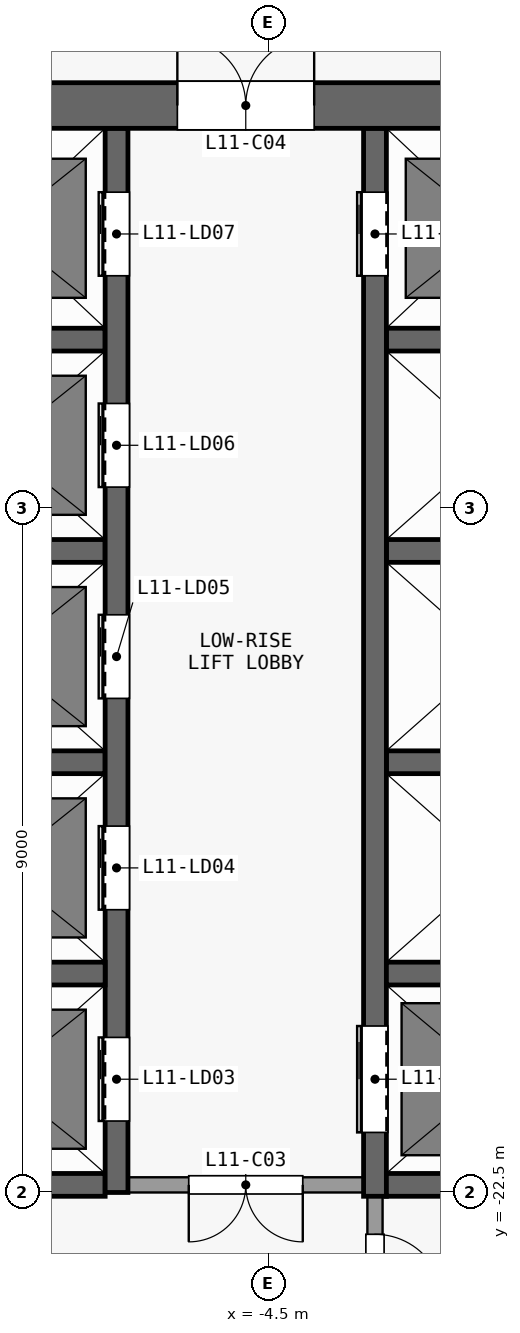
"""IFC4 building model, lengths in metres.
Left out: names, types, materials, properties, quantities, classifications, styles, units other than length and angle.
Written with IfcOpenShell. Run it as: python <this file> out.ifc"""

import sys

from ifc_helpers import new_model, si_unit, direction, frame, frame_2d, origin, place, context, subcontext, project, spatial, rectangle, extrude, element, fill, save


model = new_model("IFC4")
c1 = context("Model", 3, precision=1e-05, world=origin(), true_north=direction((0.0, 1.0)))
c2 = subcontext(c1, "Body", "Model", "MODEL_VIEW")
j1 = project(units=[si_unit("LENGTHUNIT", "METRE"), si_unit("PLANEANGLEUNIT", "RADIAN")], contexts=[c1])
p1 = place(None, origin())
s1 = spatial("IfcSite", under=j1, at=p1, CompositionType="ELEMENT")
p2 = place(p1, origin())
s2 = spatial("IfcBuilding", under=s1, at=p2, CompositionType="ELEMENT")
p3 = place(p2, frame((0.0, 0.0, 50.5)))
s3 = spatial("IfcBuildingStorey", under=s2, at=p3, CompositionType="ELEMENT", Elevation=50.5)
p4 = place(p3, frame((-13.5, -8.2, 0.0), z_axis=(0.0, 0.0, 1.0), x_axis=(1.0, 0.0, 0.0)))
e1 = element("IfcWall", 1, at=p4, inside=s3, PredefinedType="SHEAR", context=c2, shape_type="SweptSolid", body=[
    extrude(rectangle(XDim=27.0, YDim=0.6, at=frame_2d((13.5, 0.0))), origin(), (0.0, 0.0, 1.0), 3.3),
])
p5 = place(p4, frame((7.8, 0.0, 0.0)))
e2 = element("IfcOpeningElement", 2, at=p5, cuts=e1, PredefinedType="OPENING", context=c2, shape_type="SweptSolid", body=[
    extrude(rectangle(XDim=1.8, YDim=2.1, at=frame_2d((0.9, 1.05))), frame((0.0, 0.31, 0.0), z_axis=(0.0, -1.0, 0.0), x_axis=(1.0, 0.0, 0.0)), (0.0, 0.0, 1.0), 0.62),
])
p6 = place(p4, frame((17.4, 0.0, 0.0)))
e3 = element("IfcOpeningElement", 3, at=p6, cuts=e1, PredefinedType="OPENING", context=c2, shape_type="SweptSolid", body=[
    extrude(rectangle(XDim=1.8, YDim=2.1, at=frame_2d((0.9, 1.05))), frame((0.0, 0.31, 0.0), z_axis=(0.0, -1.0, 0.0), x_axis=(1.0, 0.0, 0.0)), (0.0, 0.0, 1.0), 0.62),
])
p7 = place(p4, frame((2.725, 0.0, 0.0)))
e4 = element("IfcOpeningElement", 4, at=p7, cuts=e1, PredefinedType="OPENING", context=c2, shape_type="SweptSolid", body=[
    extrude(rectangle(XDim=0.9, YDim=2.1, at=frame_2d((0.45, 1.05))), frame((0.0, 0.31, 0.0), z_axis=(0.0, -1.0, 0.0), x_axis=(1.0, 0.0, 0.0)), (0.0, 0.0, 1.0), 0.62),
])
p8 = place(p4, frame((23.375, 0.0, 0.0)))
e5 = element("IfcOpeningElement", 5, at=p8, cuts=e1, PredefinedType="OPENING", context=c2, shape_type="SweptSolid", body=[
    extrude(rectangle(XDim=0.9, YDim=2.1, at=frame_2d((0.45, 1.05))), frame((0.0, 0.31, 0.0), z_axis=(0.0, -1.0, 0.0), x_axis=(1.0, 0.0, 0.0)), (0.0, 0.0, 1.0), 0.62),
])
p9 = place(p3, frame((-9.45, -22.4, 0.0), z_axis=(0.0, 0.0, 1.0), x_axis=(1.0, 0.0, 0.0)))
e6 = element("IfcWall", 6, at=p9, inside=s3, PredefinedType="SHEAR", context=c2, shape_type="SweptSolid", body=[
    extrude(rectangle(XDim=2.8, YDim=0.3, at=frame_2d((1.4, 0.0))), origin(), (0.0, 0.0, 1.0), 3.3),
])
p10 = place(p3, frame((-3.25, -22.4, 0.0), z_axis=(0.0, 0.0, 1.0), x_axis=(-1.0, 0.0, 0.0)))
e7 = element("IfcWall", 7, at=p10, inside=s3, PredefinedType="PARTITIONING", context=c2, shape_type="SweptSolid", body=[
    extrude(rectangle(XDim=3.1, YDim=0.2, at=frame_2d((1.55, 0.0))), origin(), (0.0, 0.0, 1.0), 3.3),
])
p11 = place(p10, frame((0.8, 0.0, 0.0)))
e8 = element("IfcOpeningElement", 8, at=p11, cuts=e7, PredefinedType="OPENING", context=c2, shape_type="SweptSolid", body=[
    extrude(rectangle(XDim=1.5, YDim=2.1, at=frame_2d((0.75, 1.05))), frame((0.0, 0.11, 0.0), z_axis=(0.0, -1.0, 0.0), x_axis=(1.0, 0.0, 0.0)), (0.0, 0.0, 1.0), 0.22),
])
p12 = place(p3, frame((-2.95, -22.4, 0.0), z_axis=(0.0, 0.0, 1.0), x_axis=(1.0, 0.0, 0.0)))
e9 = element("IfcWall", 9, at=p12, inside=s3, PredefinedType="SHEAR", context=c2, shape_type="SweptSolid", body=[
    extrude(rectangle(XDim=6.2, YDim=0.3, at=frame_2d((3.1, 0.0))), origin(), (0.0, 0.0, 1.0), 3.3),
])
for number, where, z_axis, x_axis in (
    (10, (-9.45, -19.62, 0.0), (0.0, 0.0, 1.0), (1.0, 0.0, 0.0)),
    (11, (-2.95, -19.62, 0.0), (0.0, 0.0, 1.0), (1.0, 0.0, 0.0)),
    (12, (-9.45, -16.84, 0.0), (0.0, 0.0, 1.0), (1.0, 0.0, 0.0)),
    (13, (-2.95, -16.84, 0.0), (0.0, 0.0, 1.0), (1.0, 0.0, 0.0)),
    (14, (-9.45, -14.06, 0.0), (0.0, 0.0, 1.0), (1.0, 0.0, 0.0)),
    (15, (-2.95, -14.06, 0.0), (0.0, 0.0, 1.0), (1.0, 0.0, 0.0)),
    (16, (-9.45, -11.28, 0.0), (0.0, 0.0, 1.0), (1.0, 0.0, 0.0)),
    (17, (-2.95, -11.28, 0.0), (0.0, 0.0, 1.0), (1.0, 0.0, 0.0)),
):
    element("IfcWall", number, at=place(p3, frame(where, z_axis=z_axis, x_axis=x_axis)), inside=s3, PredefinedType="SHEAR", context=c2, shape_type="SweptSolid", body=[
        extrude(rectangle(XDim=2.8, YDim=0.3, at=frame_2d((1.4, 0.0))), origin(), (0.0, 0.0, 1.0), 3.3),
    ])
p13 = place(p3, frame((-6.5, -22.5, 0.0), z_axis=(0.0, 0.0, 1.0), x_axis=(0.0, 1.0, 0.0)))
e18 = element("IfcWall", 18, at=p13, inside=s3, PredefinedType="SHEAR", context=c2, shape_type="SweptSolid", body=[
    extrude(rectangle(XDim=14.0, YDim=0.3, at=frame_2d((7.0, 0.0))), origin(), (0.0, 0.0, 1.0), 3.3),
])
p14 = place(p13, frame((0.94, 0.0, 0.0)))
e19 = element("IfcOpeningElement", 19, at=p14, cuts=e18, PredefinedType="OPENING", context=c2, shape_type="SweptSolid", body=[
    extrude(rectangle(XDim=1.1, YDim=2.1, at=frame_2d((0.55, 1.05))), frame((0.0, 0.16, 0.0), z_axis=(0.0, -1.0, 0.0), x_axis=(1.0, 0.0, 0.0)), (0.0, 0.0, 1.0), 0.32),
])
p15 = place(p13, frame((3.72, 0.0, 0.0)))
e20 = element("IfcOpeningElement", 20, at=p15, cuts=e18, PredefinedType="OPENING", context=c2, shape_type="SweptSolid", body=[
    extrude(rectangle(XDim=1.1, YDim=2.1, at=frame_2d((0.55, 1.05))), frame((0.0, 0.16, 0.0), z_axis=(0.0, -1.0, 0.0), x_axis=(1.0, 0.0, 0.0)), (0.0, 0.0, 1.0), 0.32),
])
p16 = place(p13, frame((6.5, 0.0, 0.0)))
e21 = element("IfcOpeningElement", 21, at=p16, cuts=e18, PredefinedType="OPENING", context=c2, shape_type="SweptSolid", body=[
    extrude(rectangle(XDim=1.1, YDim=2.1, at=frame_2d((0.55, 1.05))), frame((0.0, 0.16, 0.0), z_axis=(0.0, -1.0, 0.0), x_axis=(1.0, 0.0, 0.0)), (0.0, 0.0, 1.0), 0.32),
])
p17 = place(p13, frame((9.28, 0.0, 0.0)))
e22 = element("IfcOpeningElement", 22, at=p17, cuts=e18, PredefinedType="OPENING", context=c2, shape_type="SweptSolid", body=[
    extrude(rectangle(XDim=1.1, YDim=2.1, at=frame_2d((0.55, 1.05))), frame((0.0, 0.16, 0.0), z_axis=(0.0, -1.0, 0.0), x_axis=(1.0, 0.0, 0.0)), (0.0, 0.0, 1.0), 0.32),
])
p18 = place(p13, frame((12.06, 0.0, 0.0)))
e23 = element("IfcOpeningElement", 23, at=p18, cuts=e18, PredefinedType="OPENING", context=c2, shape_type="SweptSolid", body=[
    extrude(rectangle(XDim=1.1, YDim=2.1, at=frame_2d((0.55, 1.05))), frame((0.0, 0.16, 0.0), z_axis=(0.0, -1.0, 0.0), x_axis=(1.0, 0.0, 0.0)), (0.0, 0.0, 1.0), 0.32),
])
p19 = place(p3, frame((-3.1, -22.55, 0.0), z_axis=(0.0, 0.0, 1.0), x_axis=(0.0, -1.0, 0.0)))
e24 = element("IfcWall", 24, at=p19, inside=s3, PredefinedType="PARTITIONING", context=c2, shape_type="SweptSolid", body=[
    extrude(rectangle(XDim=2.05, YDim=0.2, at=frame_2d((1.025, 0.0))), origin(), (0.0, 0.0, 1.0), 3.3),
])
p20 = place(p19, frame((0.5, 0.0, 0.0)))
e25 = element("IfcOpeningElement", 25, at=p20, cuts=e24, PredefinedType="OPENING", context=c2, shape_type="SweptSolid", body=[
    extrude(rectangle(XDim=0.9, YDim=2.1, at=frame_2d((0.45, 1.05))), frame((0.0, 0.11, 0.0), z_axis=(0.0, -1.0, 0.0), x_axis=(1.0, 0.0, 0.0)), (0.0, 0.0, 1.0), 0.22),
])
p21 = place(p3, frame((-3.1, -22.55, 0.0), z_axis=(0.0, 0.0, 1.0), x_axis=(0.0, 1.0, 0.0)))
e26 = element("IfcWall", 26, at=p21, inside=s3, PredefinedType="SHEAR", context=c2, shape_type="SweptSolid", body=[
    extrude(rectangle(XDim=14.05, YDim=0.3, at=frame_2d((7.025, 0.0))), origin(), (0.0, 0.0, 1.0), 3.3),
])
p22 = place(p21, frame((12.11, 0.0, 0.0)))
e27 = element("IfcOpeningElement", 27, at=p22, cuts=e26, PredefinedType="OPENING", context=c2, shape_type="SweptSolid", body=[
    extrude(rectangle(XDim=1.1, YDim=2.1, at=frame_2d((0.55, 1.05))), frame((0.0, 0.16, 0.0), z_axis=(0.0, -1.0, 0.0), x_axis=(1.0, 0.0, 0.0)), (0.0, 0.0, 1.0), 0.32),
])
p23 = place(p21, frame((0.84, 0.0, 0.0)))
e28 = element("IfcOpeningElement", 28, at=p23, cuts=e26, PredefinedType="OPENING", context=c2, shape_type="SweptSolid", body=[
    extrude(rectangle(XDim=1.4, YDim=2.1, at=frame_2d((0.7, 1.05))), frame((0.0, 0.16, 0.0), z_axis=(0.0, -1.0, 0.0), x_axis=(1.0, 0.0, 0.0)), (0.0, 0.0, 1.0), 0.32),
])
p24 = place(p14, origin())
e29 = element("IfcDoor", 29, at=p24, inside=s3, OperationType="DOUBLE_DOOR_SLIDING", PredefinedType="DOOR", context=c2, shape_type="SweptSolid", body=[
    extrude(rectangle(XDim=1.1, YDim=2.1, at=frame_2d((0.55, 1.05))), frame((0.0, 0.025, 0.0), z_axis=(0.0, -1.0, 0.0), x_axis=(1.0, 0.0, 0.0)), (0.0, 0.0, 1.0), 0.05),
])
fill(e19, e29)
p25 = place(p15, origin())
e30 = element("IfcDoor", 30, at=p25, inside=s3, OperationType="DOUBLE_DOOR_SLIDING", PredefinedType="DOOR", context=c2, shape_type="SweptSolid", body=[
    extrude(rectangle(XDim=1.1, YDim=2.1, at=frame_2d((0.55, 1.05))), frame((0.0, 0.025, 0.0), z_axis=(0.0, -1.0, 0.0), x_axis=(1.0, 0.0, 0.0)), (0.0, 0.0, 1.0), 0.05),
])
fill(e20, e30)
p26 = place(p16, origin())
e31 = element("IfcDoor", 31, at=p26, inside=s3, OperationType="DOUBLE_DOOR_SLIDING", PredefinedType="DOOR", context=c2, shape_type="SweptSolid", body=[
    extrude(rectangle(XDim=1.1, YDim=2.1, at=frame_2d((0.55, 1.05))), frame((0.0, 0.025, 0.0), z_axis=(0.0, -1.0, 0.0), x_axis=(1.0, 0.0, 0.0)), (0.0, 0.0, 1.0), 0.05),
])
fill(e21, e31)
p27 = place(p17, origin())
e32 = element("IfcDoor", 32, at=p27, inside=s3, OperationType="DOUBLE_DOOR_SLIDING", PredefinedType="DOOR", context=c2, shape_type="SweptSolid", body=[
    extrude(rectangle(XDim=1.1, YDim=2.1, at=frame_2d((0.55, 1.05))), frame((0.0, 0.025, 0.0), z_axis=(0.0, -1.0, 0.0), x_axis=(1.0, 0.0, 0.0)), (0.0, 0.0, 1.0), 0.05),
])
fill(e22, e32)
p28 = place(p18, origin())
e33 = element("IfcDoor", 33, at=p28, inside=s3, OperationType="DOUBLE_DOOR_SLIDING", PredefinedType="DOOR", context=c2, shape_type="SweptSolid", body=[
    extrude(rectangle(XDim=1.1, YDim=2.1, at=frame_2d((0.55, 1.05))), frame((0.0, 0.025, 0.0), z_axis=(0.0, -1.0, 0.0), x_axis=(1.0, 0.0, 0.0)), (0.0, 0.0, 1.0), 0.05),
])
fill(e23, e33)
p29 = place(p22, origin())
e34 = element("IfcDoor", 34, at=p29, inside=s3, OperationType="DOUBLE_DOOR_SLIDING", PredefinedType="DOOR", context=c2, shape_type="SweptSolid", body=[
    extrude(rectangle(XDim=1.1, YDim=2.1, at=frame_2d((0.55, 1.05))), frame((0.0, 0.025, 0.0), z_axis=(0.0, -1.0, 0.0), x_axis=(1.0, 0.0, 0.0)), (0.0, 0.0, 1.0), 0.05),
])
fill(e27, e34)
p30 = place(p23, origin())
e35 = element("IfcDoor", 35, at=p30, inside=s3, OperationType="DOUBLE_DOOR_SLIDING", PredefinedType="DOOR", context=c2, shape_type="SweptSolid", body=[
    extrude(rectangle(XDim=1.4, YDim=2.1, at=frame_2d((0.7, 1.05))), frame((0.0, 0.025, 0.0), z_axis=(0.0, -1.0, 0.0), x_axis=(1.0, 0.0, 0.0)), (0.0, 0.0, 1.0), 0.05),
])
fill(e28, e35)
p31 = place(p11, origin())
e36 = element("IfcDoor", 36, at=p31, inside=s3, OperationType="DOUBLE_DOOR_SINGLE_SWING", PredefinedType="DOOR", context=c2, shape_type="SweptSolid", body=[
    extrude(rectangle(XDim=1.5, YDim=2.1, at=frame_2d((0.75, 1.05))), frame((0.0, 0.025, 0.0), z_axis=(0.0, -1.0, 0.0), x_axis=(1.0, 0.0, 0.0)), (0.0, 0.0, 1.0), 0.05),
])
fill(e8, e36)
p32 = place(p5, origin())
e37 = element("IfcDoor", 37, at=p32, inside=s3, OperationType="DOUBLE_DOOR_SINGLE_SWING", PredefinedType="DOOR", context=c2, shape_type="SweptSolid", body=[
    extrude(rectangle(XDim=1.8, YDim=2.1, at=frame_2d((0.9, 1.05))), frame((0.0, 0.025, 0.0), z_axis=(0.0, -1.0, 0.0), x_axis=(1.0, 0.0, 0.0)), (0.0, 0.0, 1.0), 0.05),
])
fill(e2, e37)
p33 = place(p20, origin())
e38 = element("IfcDoor", 38, at=p33, inside=s3, OperationType="SINGLE_SWING_RIGHT", PredefinedType="DOOR", context=c2, shape_type="SweptSolid", body=[
    extrude(rectangle(XDim=0.9, YDim=2.1, at=frame_2d((0.45, 1.05))), frame((0.0, 0.025, 0.0), z_axis=(0.0, -1.0, 0.0), x_axis=(1.0, 0.0, 0.0)), (0.0, 0.0, 1.0), 0.05),
])
fill(e25, e38)
save(model, sys.argv[1])
